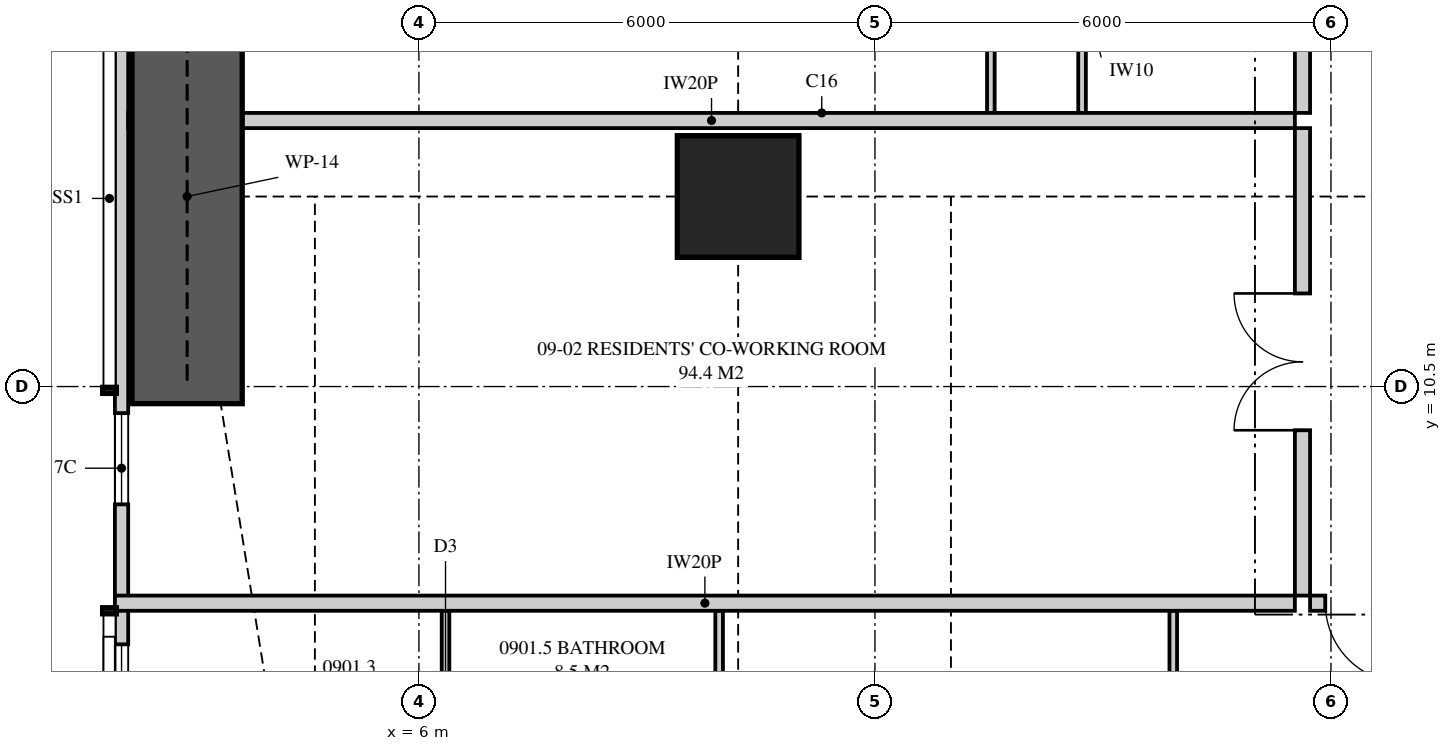
"""IFC4 building model, lengths in metres.
Left out: names, types, materials, properties, quantities, classifications, styles, units other than length and angle.
Written with IfcOpenShell. Run it as: python <this file> out.ifc"""

import sys

from ifc_helpers import new_model, si_unit, direction, frame, frame_2d, origin, origin_2d, place, context, subcontext, project, spatial, polyline, rectangle, outline, extrude, element, fill, save


model = new_model("IFC4")
c1 = context("Model", 3, precision=1e-05, world=origin(), true_north=direction((0.0, 1.0)))
c2 = subcontext(c1, "Body", "Model", "MODEL_VIEW")
j1 = project(units=[si_unit("LENGTHUNIT", "METRE"), si_unit("PLANEANGLEUNIT", "RADIAN")], contexts=[c1])
p1 = place(None, origin())
s1 = spatial("IfcSite", under=j1, at=p1, CompositionType="ELEMENT")
p2 = place(p1, origin())
s2 = spatial("IfcBuilding", under=s1, at=p2, CompositionType="ELEMENT")
p3 = place(p2, frame((0.0, 0.0, 37.75)))
s3 = spatial("IfcBuildingStorey", under=s2, at=p3, CompositionType="ELEMENT", Elevation=37.75)
p4 = place(p3, frame((10.2, 13.0, 0.0), z_axis=(0.0, 0.0, 1.0), x_axis=(1.0, 0.0, 0.0)))
e1 = element("IfcColumn", 1, at=p4, inside=s3, PredefinedType="COLUMN", context=c2, shape_type="SweptSolid", body=[
    extrude(rectangle(XDim=1.6, YDim=1.6, at=origin_2d()), origin(), (0.0, 0.0, 1.0), 3.35),
])
p5 = place(p3, frame((2.087, 15.8, 0.0), z_axis=(0.0, 0.0, 1.0), x_axis=(0.0, -1.0, 0.0)))
e2 = element("IfcWall", 2, at=p5, inside=s3, PredefinedType="SOLIDWALL", context=c2, shape_type="SweptSolid", body=[
    extrude(outline(polyline([(0.0, 0.0), (12.749, 0.0), (12.749, 3.11), (3.019, 3.11), (3.019, 2.15), (2.926, 2.15), (2.926, 3.11), (2.8, 3.11), (2.8, 2.15), (0.0, 2.15), (0.0, 0.0)])), frame((0.0, 0.087, 0.0), z_axis=(0.0, -1.0, 0.0), x_axis=(1.0, 0.0, 0.0)), (0.0, 0.0, 1.0), 0.175),
])
p6 = place(p5, frame((5.65, 0.0, 0.4)))
e3 = element("IfcOpeningElement", 3, at=p6, cuts=e2, PredefinedType="OPENING", context=c2, shape_type="SweptSolid", body=[
    extrude(rectangle(XDim=1.2, YDim=1.7, at=frame_2d((0.6, 0.85))), frame((0.0, 0.097, 0.0), z_axis=(0.0, -1.0, 0.0), x_axis=(1.0, 0.0, 0.0)), (0.0, 0.0, 1.0), 0.195),
])
p7 = place(p5, frame((8.691, 0.0, 0.4)))
e4 = element("IfcOpeningElement", 4, at=p7, cuts=e2, PredefinedType="OPENING", context=c2, shape_type="SweptSolid", body=[
    extrude(rectangle(XDim=1.8, YDim=1.7, at=frame_2d((0.9, 0.85))), frame((0.0, 0.097, 0.0), z_axis=(0.0, -1.0, 0.0), x_axis=(1.0, 0.0, 0.0)), (0.0, 0.0, 1.0), 0.195),
])
p8 = place(p3, frame((17.725, 7.65, 0.0), z_axis=(0.0, 0.0, 1.0), x_axis=(1.0, 0.0, 0.0)))
e5 = element("IfcWall", 5, at=p8, inside=s3, PredefinedType="PARTITIONING", context=c2, shape_type="SweptSolid", body=[
    extrude(rectangle(XDim=4.125, YDim=0.2, at=frame_2d((2.062, 0.0))), origin(), (0.0, 0.0, 1.0), 3.11),
])
p9 = place(p8, frame((0.2, 0.0, 0.0)))
e6 = element("IfcOpeningElement", 6, at=p9, cuts=e5, PredefinedType="OPENING", context=c2, shape_type="SweptSolid", body=[
    extrude(rectangle(XDim=1.05, YDim=2.2, at=frame_2d((0.525, 1.1))), frame((0.0, 0.11, 0.0), z_axis=(0.0, -1.0, 0.0), x_axis=(1.0, 0.0, 0.0)), (0.0, 0.0, 1.0), 0.22),
])
p10 = place(p3, frame((6.35, 0.175, 0.0), z_axis=(0.0, 0.0, 1.0), x_axis=(0.0, 1.0, 0.0)))
e7 = element("IfcWall", 7, at=p10, inside=s3, PredefinedType="PARTITIONING", context=c2, shape_type="SweptSolid", body=[
    extrude(outline(polyline([(0.0, 0.0), (7.375, 0.0), (7.375, 3.11), (2.988, 3.11), (2.988, 2.15), (1.234, 2.15), (1.234, 3.11), (0.0, 3.11), (0.0, 0.0)])), frame((0.0, 0.05, 0.0), z_axis=(0.0, -1.0, 0.0), x_axis=(1.0, 0.0, 0.0)), (0.0, 0.0, 1.0), 0.1),
])
p11 = place(p10, frame((3.492, 0.0, 0.0)))
e8 = element("IfcOpeningElement", 8, at=p11, cuts=e7, PredefinedType="OPENING", context=c2, shape_type="SweptSolid", body=[
    extrude(rectangle(XDim=0.9, YDim=2.1, at=frame_2d((0.45, 1.05))), frame((0.0, 0.06, 0.0), z_axis=(0.0, -1.0, 0.0), x_axis=(1.0, 0.0, 0.0)), (0.0, 0.0, 1.0), 0.12),
])
p12 = place(p10, frame((5.559, 0.0, 0.0)))
e9 = element("IfcOpeningElement", 9, at=p12, cuts=e7, PredefinedType="OPENING", context=c2, shape_type="SweptSolid", body=[
    extrude(rectangle(XDim=0.9, YDim=2.1, at=frame_2d((0.45, 1.05))), frame((0.0, 0.06, 0.0), z_axis=(0.0, -1.0, 0.0), x_axis=(1.0, 0.0, 0.0)), (0.0, 0.0, 1.0), 0.12),
])
p13 = place(p3, frame((9.95, 1.513, 0.0), z_axis=(0.0, 0.0, 1.0), x_axis=(0.0, 1.0, 0.0)))
e10 = element("IfcWall", 10, at=p13, inside=s3, PredefinedType="PARTITIONING", context=c2, shape_type="SweptSolid", body=[
    extrude(outline(polyline([(0.0, 0.0), (6.037, 0.0), (6.037, 2.51), (0.927, 2.51), (0.927, 2.15), (0.0, 2.15), (0.0, 0.0)])), frame((0.0, 0.05, 0.0), z_axis=(0.0, -1.0, 0.0), x_axis=(1.0, 0.0, 0.0)), (0.0, 0.0, 1.0), 0.1),
])
p14 = place(p13, frame((2.188, 0.0, 0.0)))
e11 = element("IfcOpeningElement", 11, at=p14, cuts=e10, PredefinedType="OPENING", context=c2, shape_type="SweptSolid", body=[
    extrude(rectangle(XDim=0.9, YDim=2.1, at=frame_2d((0.45, 1.05))), frame((0.0, 0.06, 0.0), z_axis=(0.0, -1.0, 0.0), x_axis=(1.0, 0.0, 0.0)), (0.0, 0.0, 1.0), 0.12),
])
p15 = place(p13, frame((3.612, 0.0, 0.0)))
e12 = element("IfcOpeningElement", 12, at=p15, cuts=e10, PredefinedType="OPENING", context=c2, shape_type="SweptSolid", body=[
    extrude(rectangle(XDim=0.9, YDim=2.1, at=frame_2d((0.45, 1.05))), frame((0.0, 0.06, 0.0), z_axis=(0.0, -1.0, 0.0), x_axis=(1.0, 0.0, 0.0)), (0.0, 0.0, 1.0), 0.12),
])
p16 = place(p3, frame((15.925, 0.175, 0.0), z_axis=(0.0, 0.0, 1.0), x_axis=(0.0, 1.0, 0.0)))
e13 = element("IfcWall", 13, at=p16, inside=s3, PredefinedType="PARTITIONING", context=c2, shape_type="SweptSolid", body=[
    extrude(outline(polyline([(0.0, 0.0), (7.375, 0.0), (7.375, 3.11), (1.635, 3.11), (1.635, 2.15), (0.0, 2.15), (0.0, 3.11), (0.0, 0.0)])), frame((0.0, 0.05, 0.0), z_axis=(0.0, -1.0, 0.0), x_axis=(1.0, 0.0, 0.0)), (0.0, 0.0, 1.0), 0.1),
])
p17 = place(p16, frame((3.188, 0.0, 0.0)))
e14 = element("IfcOpeningElement", 14, at=p17, cuts=e13, PredefinedType="OPENING", context=c2, shape_type="SweptSolid", body=[
    extrude(rectangle(XDim=1.0, YDim=2.1, at=frame_2d((0.5, 1.05))), frame((0.0, 0.06, 0.0), z_axis=(0.0, -1.0, 0.0), x_axis=(1.0, 0.0, 0.0)), (0.0, 0.0, 1.0), 0.12),
])
p18 = place(p3, frame((2.0, 7.65, 0.0), z_axis=(0.0, 0.0, 1.0), x_axis=(1.0, 0.0, 0.0)))
e15 = element("IfcWall", 15, at=p18, inside=s3, PredefinedType="PARTITIONING", context=c2, shape_type="SweptSolid", body=[
    extrude(outline(polyline([(0.0, 0.0), (15.525, 0.0), (15.525, 3.11), (11.337, 3.11), (11.337, 2.541), (10.663, 2.541), (10.663, 3.11), (9.51, 3.11), (9.51, 2.51), (6.89, 2.51), (6.89, 3.11), (2.969, 3.11), (2.969, 2.541), (2.74, 2.541), (2.74, 2.15), (0.896, 2.15), (0.896, 3.11), (0.0, 3.11), (0.0, 0.0)])), frame((0.0, 0.1, 0.0), z_axis=(0.0, -1.0, 0.0), x_axis=(1.0, 0.0, 0.0)), (0.0, 0.0, 1.0), 0.2),
])
p19 = place(p3, frame((2.175, 14.0, 0.0), z_axis=(0.0, 0.0, 1.0), x_axis=(1.0, 0.0, 0.0)))
e16 = element("IfcWall", 16, at=p19, inside=s3, PredefinedType="PARTITIONING", context=c2, shape_type="SweptSolid", body=[
    extrude(outline(polyline([(0.529, 2.15), (0.0, 2.15), (0.0, 0.0), (0.529, 0.0), (0.529, 0.815), (1.021, 0.815), (1.021, 0.0), (15.35, 0.0), (15.35, 3.11), (9.335, 3.11), (9.335, 2.51), (6.715, 2.51), (6.715, 3.11), (1.685, 3.11), (1.685, 2.15), (1.021, 2.15), (1.021, 1.335), (0.529, 1.335), (0.529, 2.15)])), frame((0.0, 0.1, 0.0), z_axis=(0.0, -1.0, 0.0), x_axis=(1.0, 0.0, 0.0)), (0.0, 0.0, 1.0), 0.2),
])
p20 = place(p3, frame((17.625, 7.75, 0.0), z_axis=(0.0, 0.0, 1.0), x_axis=(0.0, 1.0, 0.0)))
e17 = element("IfcWall", 17, at=p20, inside=s3, PredefinedType="PARTITIONING", context=c2, shape_type="SweptSolid", body=[
    extrude(outline(polyline([(0.0, 0.0), (6.15, 0.0), (6.15, 3.11), (5.587, 3.11), (5.587, 2.541), (4.913, 2.541), (4.913, 3.11), (0.0, 3.11), (0.0, 0.0)])), frame((0.0, 0.1, 0.0), z_axis=(0.0, -1.0, 0.0), x_axis=(1.0, 0.0, 0.0)), (0.0, 0.0, 1.0), 0.2),
])
p21 = place(p20, frame((2.175, 0.0, 0.0)))
e18 = element("IfcOpeningElement", 18, at=p21, cuts=e17, PredefinedType="OPENING", context=c2, shape_type="SweptSolid", body=[
    extrude(rectangle(XDim=1.8, YDim=2.1, at=frame_2d((0.9, 1.05))), frame((0.0, 0.11, 0.0), z_axis=(0.0, -1.0, 0.0), x_axis=(1.0, 0.0, 0.0)), (0.0, 0.0, 1.0), 0.22),
])
p22 = place(p3, frame((17.625, 14.1, 0.0), z_axis=(0.0, 0.0, 1.0), x_axis=(0.0, 1.0, 0.0)))
e19 = element("IfcWall", 19, at=p22, inside=s3, PredefinedType="PARTITIONING", context=c2, shape_type="SweptSolid", body=[
    extrude(rectangle(XDim=9.8, YDim=0.2, at=frame_2d((4.9, 0.0))), origin(), (0.0, 0.0, 1.0), 3.11),
])
p23 = place(p22, frame((4.4, 0.0, 0.0)))
e20 = element("IfcOpeningElement", 20, at=p23, cuts=e19, PredefinedType="OPENING", context=c2, shape_type="SweptSolid", body=[
    extrude(rectangle(XDim=1.05, YDim=2.2, at=frame_2d((0.525, 1.1))), frame((0.0, 0.11, 0.0), z_axis=(0.0, -1.0, 0.0), x_axis=(1.0, 0.0, 0.0)), (0.0, 0.0, 1.0), 0.22),
])
p24 = place(p3, frame((13.525, 14.1, 0.0), z_axis=(0.0, 0.0, 1.0), x_axis=(0.0, 1.0, 0.0)))
e21 = element("IfcWall", 21, at=p24, inside=s3, PredefinedType="PARTITIONING", context=c2, shape_type="SweptSolid", body=[
    extrude(rectangle(XDim=5.8, YDim=0.1, at=frame_2d((2.9, 0.0))), origin(), (0.0, 0.0, 1.0), 3.11),
])
p25 = place(p24, frame((4.4, 0.0, 0.0)))
e22 = element("IfcOpeningElement", 22, at=p25, cuts=e21, PredefinedType="OPENING", context=c2, shape_type="SweptSolid", body=[
    extrude(rectangle(XDim=1.0, YDim=2.1, at=frame_2d((0.5, 1.05))), frame((0.0, 0.06, 0.0), z_axis=(0.0, -1.0, 0.0), x_axis=(1.0, 0.0, 0.0)), (0.0, 0.0, 1.0), 0.12),
])
p26 = place(p3, frame((14.725, 14.1, 0.0), z_axis=(0.0, 0.0, 1.0), x_axis=(0.0, 1.0, 0.0)))
e23 = element("IfcWall", 23, at=p26, inside=s3, PredefinedType="PARTITIONING", context=c2, shape_type="SweptSolid", body=[
    extrude(rectangle(XDim=3.35, YDim=0.1, at=frame_2d((1.675, 0.0))), origin(), (0.0, 0.0, 1.0), 3.11),
])
p27 = place(p3, frame((2.95, 10.275, 0.0), z_axis=(0.0, 0.0, 1.0), x_axis=(0.0, 1.0, 0.0)))
e24 = element("IfcWall", 24, at=p27, inside=s3, PredefinedType="SHEAR", context=c2, shape_type="SweptSolid", body=[
    extrude(rectangle(XDim=5.45, YDim=1.45, at=frame_2d((2.725, 0.0))), origin(), (0.0, 0.0, 1.0), 3.35),
])
p28 = place(p6, origin())
e25 = element("IfcWindow", 25, at=p28, inside=s3, PartitioningType="SINGLE_PANEL", PredefinedType="WINDOW", context=c2, shape_type="SweptSolid", body=[
    extrude(rectangle(XDim=1.2, YDim=1.7, at=frame_2d((0.6, 0.85))), frame((0.0, 0.03, 0.0), z_axis=(0.0, -1.0, 0.0), x_axis=(1.0, 0.0, 0.0)), (0.0, 0.0, 1.0), 0.06),
])
fill(e3, e25)
p29 = place(p7, origin())
e26 = element("IfcWindow", 26, at=p29, inside=s3, PartitioningType="SINGLE_PANEL", PredefinedType="WINDOW", context=c2, shape_type="SweptSolid", body=[
    extrude(rectangle(XDim=1.8, YDim=1.7, at=frame_2d((0.9, 0.85))), frame((0.0, 0.03, 0.0), z_axis=(0.0, -1.0, 0.0), x_axis=(1.0, 0.0, 0.0)), (0.0, 0.0, 1.0), 0.06),
])
fill(e4, e26)
p30 = place(p9, frame((1.05, 0.0, 0.0), z_axis=(0.0, 0.0, 1.0), x_axis=(-1.0, 0.0, 0.0)))
e27 = element("IfcDoor", 27, at=p30, inside=s3, OperationType="SINGLE_SWING_LEFT", PredefinedType="DOOR", context=c2, shape_type="SweptSolid", body=[
    extrude(rectangle(XDim=1.05, YDim=2.2, at=frame_2d((0.525, 1.1))), frame((0.0, 0.025, 0.0), z_axis=(0.0, -1.0, 0.0), x_axis=(1.0, 0.0, 0.0)), (0.0, 0.0, 1.0), 0.05),
])
fill(e6, e27)
p31 = place(p21, origin())
e28 = element("IfcDoor", 28, at=p31, inside=s3, OperationType="DOUBLE_DOOR_SINGLE_SWING", PredefinedType="DOOR", context=c2, shape_type="SweptSolid", body=[
    extrude(rectangle(XDim=1.8, YDim=2.1, at=frame_2d((0.9, 1.05))), frame((0.0, 0.025, 0.0), z_axis=(0.0, -1.0, 0.0), x_axis=(1.0, 0.0, 0.0)), (0.0, 0.0, 1.0), 0.05),
])
fill(e18, e28)
save(model, sys.argv[1])
